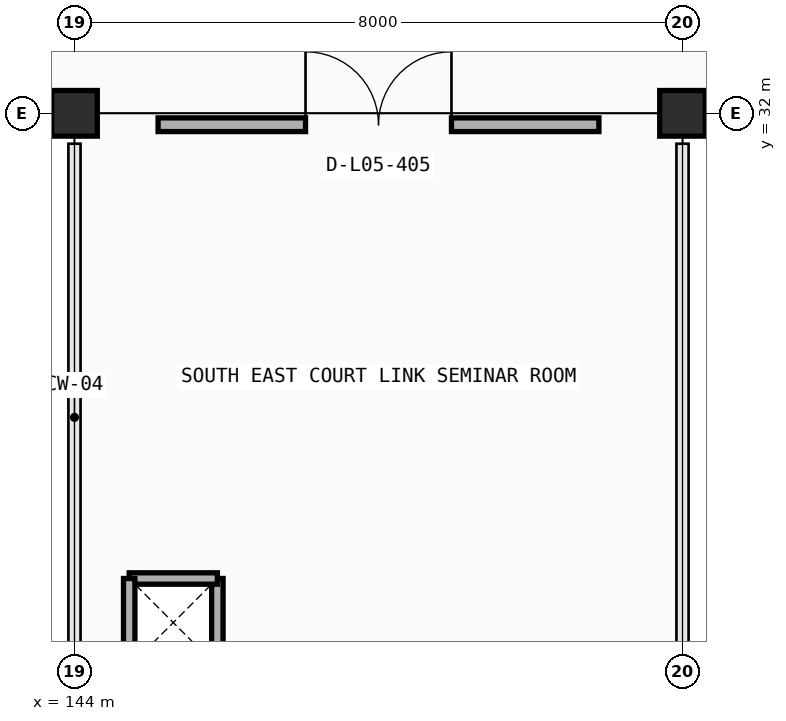
"""IFC4 building model, lengths in metres.
Left out: names, types, materials, properties, quantities, classifications, styles, units other than length and angle.
Written with IfcOpenShell. Run it as: python <this file> out.ifc"""

import sys

from ifc_helpers import new_model, si_unit, direction, frame, frame_2d, origin, origin_2d, place, context, subcontext, project, spatial, rectangle, extrude, element, fill, save


model = new_model("IFC4")
c1 = context("Model", 3, precision=1e-05, world=origin(), true_north=direction((0.0, 1.0)))
c2 = subcontext(c1, "Body", "Model", "MODEL_VIEW")
j1 = project(units=[si_unit("LENGTHUNIT", "METRE"), si_unit("PLANEANGLEUNIT", "RADIAN")], contexts=[c1])
p1 = place(None, origin())
s1 = spatial("IfcSite", under=j1, at=p1, CompositionType="ELEMENT")
p2 = place(p1, origin())
s2 = spatial("IfcBuilding", under=s1, at=p2, CompositionType="ELEMENT")
p3 = place(p2, frame((0.0, 0.0, 18.0)))
s3 = spatial("IfcBuildingStorey", under=s2, at=p3, CompositionType="ELEMENT", Elevation=18.0)
for number, where, z_axis, x_axis in (
    (1, (144.0, 32.0, 0.0), (0.0, 0.0, 1.0), (1.0, 0.0, 0.0)),
    (2, (152.0, 32.0, 0.0), (0.0, 0.0, 1.0), (1.0, 0.0, 0.0)),
):
    element("IfcColumn", number, at=place(p3, frame(where, z_axis=z_axis, x_axis=x_axis)), inside=s3, PredefinedType="COLUMN", context=c2, shape_type="SweptSolid", body=[
        extrude(rectangle(XDim=0.6, YDim=0.6, at=origin_2d()), origin(), (0.0, 0.0, 1.0), 4.2),
    ])
p4 = place(p3, frame((143.703, 32.0, 0.0), z_axis=(0.0, 0.0, 1.0), x_axis=(-1.0, 0.0, 0.0)))
e3 = element("IfcWall", 3, at=p4, inside=s3, PredefinedType="STANDARD", context=c2, shape_type="SweptSolid", body=[
    extrude(rectangle(XDim=7.406, YDim=0.185, at=frame_2d((3.703, 0.0))), origin(), (0.0, 0.0, 1.0), 3.335),
])
p5 = place(p4, frame((2.283, 0.0, 0.9)))
e4 = element("IfcOpeningElement", 4, at=p5, cuts=e3, PredefinedType="OPENING", context=c2, shape_type="SweptSolid", body=[
    extrude(rectangle(XDim=1.25, YDim=1.85, at=frame_2d((0.625, 0.925))), frame((0.0, 0.103, 0.0), z_axis=(0.0, -1.0, 0.0), x_axis=(1.0, 0.0, 0.0)), (0.0, 0.0, 1.0), 0.205),
])
p6 = place(p3, frame((159.703, 32.0, 0.0), z_axis=(0.0, 0.0, 1.0), x_axis=(-1.0, 0.0, 0.0)))
e5 = element("IfcWall", 5, at=p6, inside=s3, PredefinedType="STANDARD", context=c2, shape_type="SweptSolid", body=[
    extrude(rectangle(XDim=7.406, YDim=0.185, at=frame_2d((3.703, 0.0))), origin(), (0.0, 0.0, 1.0), 3.335),
])
p7 = place(p6, frame((2.283, 0.0, 0.9)))
e6 = element("IfcOpeningElement", 6, at=p7, cuts=e5, PredefinedType="OPENING", context=c2, shape_type="SweptSolid", body=[
    extrude(rectangle(XDim=1.05, YDim=1.85, at=frame_2d((0.525, 0.925))), frame((0.0, 0.103, 0.0), z_axis=(0.0, -1.0, 0.0), x_axis=(1.0, 0.0, 0.0)), (0.0, 0.0, 1.0), 0.205),
])
for number, where, z_axis, x_axis in (
    (7, (145.88, 24.72, 0.0), (0.0, 0.0, 1.0), (0.0, 1.0, 0.0)),
    (8, (145.88, 25.88, 0.0), (0.0, 0.0, 1.0), (-1.0, 0.0, 0.0)),
    (9, (144.72, 25.88, 0.0), (0.0, 0.0, 1.0), (0.0, -1.0, 0.0)),
):
    element("IfcWall", number, at=place(p3, frame(where, z_axis=z_axis, x_axis=x_axis)), inside=s3, PredefinedType="PARTITIONING", context=c2, shape_type="SweptSolid", body=[
        extrude(rectangle(XDim=1.16, YDim=0.15, at=frame_2d((0.58, 0.0))), origin(), (0.0, 0.0, 1.0), 3.9),
    ])
p8 = place(p3, frame((145.1, 31.85, 0.0), z_axis=(0.0, 0.0, 1.0), x_axis=(1.0, 0.0, 0.0)))
e10 = element("IfcWall", 10, at=p8, inside=s3, PredefinedType="PARTITIONING", context=c2, shape_type="SweptSolid", body=[
    extrude(rectangle(XDim=5.8, YDim=0.18, at=frame_2d((2.9, 0.0))), origin(), (0.0, 0.0, 1.0), 3.3),
])
p9 = place(p8, frame((1.94, 0.0, 0.0)))
e11 = element("IfcOpeningElement", 11, at=p9, cuts=e10, PredefinedType="OPENING", context=c2, shape_type="SweptSolid", body=[
    extrude(rectangle(XDim=1.92, YDim=2.3, at=frame_2d((0.96, 1.15))), frame((0.0, 0.1, 0.0), z_axis=(0.0, -1.0, 0.0), x_axis=(1.0, 0.0, 0.0)), (0.0, 0.0, 1.0), 0.2),
])
p10 = place(p9, origin())
e12 = element("IfcDoor", 12, at=p10, inside=s3, OperationType="DOUBLE_DOOR_SINGLE_SWING", PredefinedType="DOOR", context=c2, shape_type="SweptSolid", body=[
    extrude(rectangle(XDim=1.92, YDim=2.3, at=frame_2d((0.96, 1.15))), frame((0.0, 0.025, 0.0), z_axis=(0.0, -1.0, 0.0), x_axis=(1.0, 0.0, 0.0)), (0.0, 0.0, 1.0), 0.05),
])
fill(e11, e12)
save(model, sys.argv[1])
